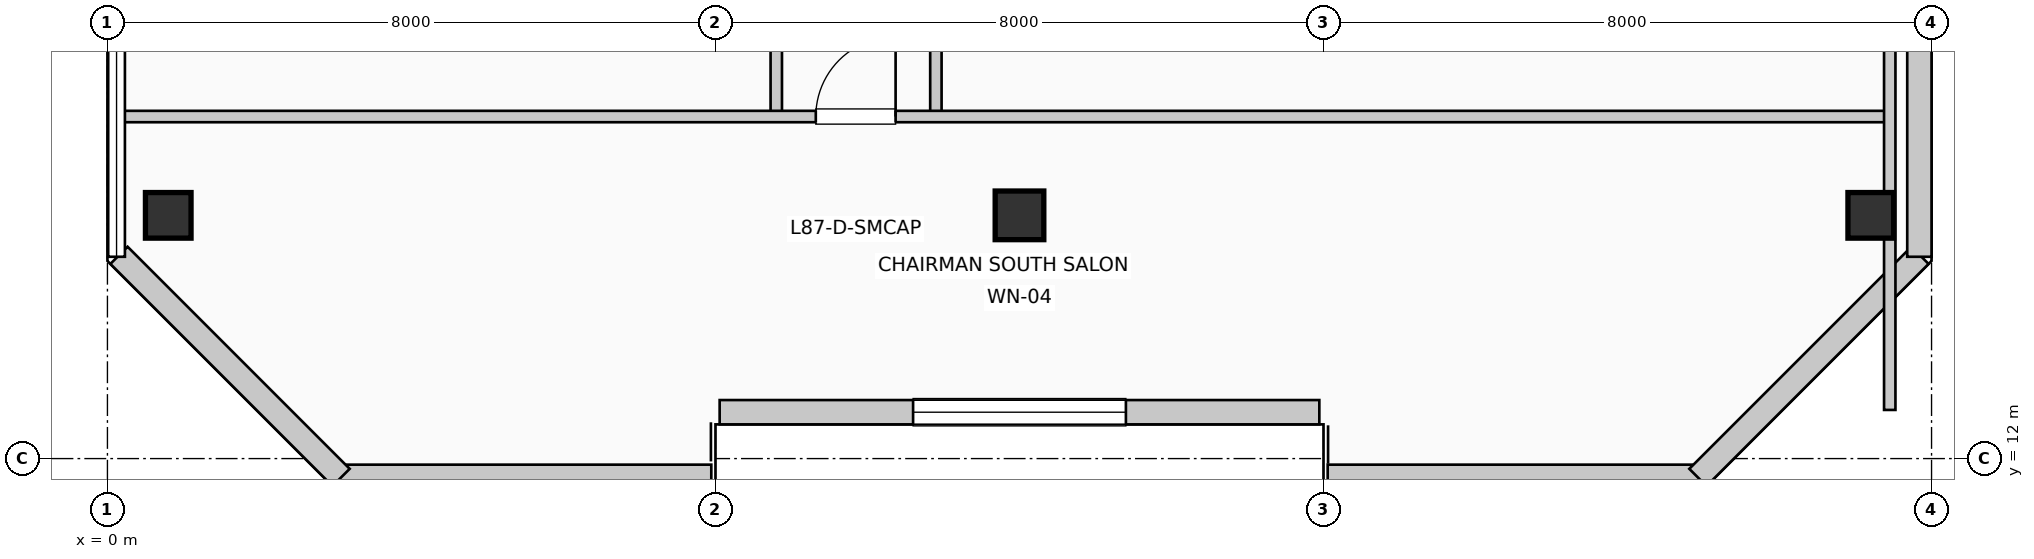
"""IFC4 building model, lengths in metres.
Left out: names, types, materials, properties, quantities, classifications, styles, units other than length and angle.
Written with IfcOpenShell. Run it as: python <this file> out.ifc"""

import sys

from ifc_helpers import new_model, si_unit, direction, frame, frame_2d, origin, origin_2d, place, context, subcontext, project, spatial, rectangle, extrude, element, fill, save


model = new_model("IFC4")
c1 = context("Model", 3, precision=1e-05, world=origin(), true_north=direction((0.0, 1.0)))
c2 = subcontext(c1, "Body", "Model", "MODEL_VIEW")
j1 = project(units=[si_unit("LENGTHUNIT", "METRE"), si_unit("PLANEANGLEUNIT", "RADIAN")], contexts=[c1])
p1 = place(None, origin())
s1 = spatial("IfcSite", under=j1, at=p1, CompositionType="ELEMENT")
p2 = place(p1, origin())
s2 = spatial("IfcBuilding", under=s1, at=p2, CompositionType="ELEMENT")
p3 = place(p2, frame((0.0, 0.0, 356.73)))
s3 = spatial("IfcBuildingStorey", under=s2, at=p3, CompositionType="ELEMENT", Elevation=356.73)
p4 = place(p3, frame((0.8, 15.2, 0.0), z_axis=(0.0, 0.0, 1.0), x_axis=(1.0, 0.0, 0.0)))
e1 = element("IfcColumn", 1, at=p4, inside=s3, PredefinedType="COLUMN", context=c2, shape_type="SweptSolid", body=[
    extrude(rectangle(XDim=0.6, YDim=0.6, at=origin_2d()), origin(), (0.0, 0.0, 1.0), 4.62),
])
p5 = place(p3, frame((12.0, 15.2, 0.0), z_axis=(0.0, 0.0, 1.0), x_axis=(1.0, 0.0, 0.0)))
e2 = element("IfcColumn", 2, at=p5, inside=s3, PredefinedType="COLUMN", context=c2, shape_type="SweptSolid", body=[
    extrude(rectangle(XDim=0.64, YDim=0.64, at=origin_2d()), origin(), (0.0, 0.0, 1.0), 4.62),
])
p6 = place(p3, frame((23.2, 15.2, 0.0), z_axis=(0.0, 0.0, 1.0), x_axis=(1.0, 0.0, 0.0)))
e3 = element("IfcColumn", 3, at=p6, inside=s3, PredefinedType="COLUMN", context=c2, shape_type="SweptSolid", body=[
    extrude(rectangle(XDim=0.6, YDim=0.6, at=origin_2d()), origin(), (0.0, 0.0, 1.0), 4.62),
])
p7 = place(p3, frame((3.055, 11.76, 0.0), z_axis=(0.0, 0.0, 1.0), x_axis=(1.0, 0.0, 0.0)))
e4 = element("IfcWall", 4, at=p7, inside=s3, PredefinedType="SOLIDWALL", context=c2, shape_type="SweptSolid", body=[
    extrude(rectangle(XDim=4.89, YDim=0.32, at=frame_2d((2.445, 0.0))), origin(), (0.0, 0.0, 1.0), 4.37),
])
p8 = place(p3, frame((8.055, 12.61, 0.0), z_axis=(0.0, 0.0, 1.0), x_axis=(1.0, 0.0, 0.0)))
e5 = element("IfcWall", 5, at=p8, inside=s3, PredefinedType="SOLIDWALL", context=c2, shape_type="SweptSolid", body=[
    extrude(rectangle(XDim=7.89, YDim=0.32, at=frame_2d((3.945, 0.0))), origin(), (0.0, 0.0, 1.0), 4.37),
])
p9 = place(p8, frame((2.545, 0.0, 0.7)))
e6 = element("IfcOpeningElement", 6, at=p9, cuts=e5, PredefinedType="OPENING", context=c2, shape_type="SweptSolid", body=[
    extrude(rectangle(XDim=2.8, YDim=2.6, at=frame_2d((1.4, 1.3))), frame((0.0, 0.17, 0.0), z_axis=(0.0, -1.0, 0.0), x_axis=(1.0, 0.0, 0.0)), (0.0, 0.0, 1.0), 0.34),
])
p10 = place(p3, frame((16.055, 11.76, 0.0), z_axis=(0.0, 0.0, 1.0), x_axis=(1.0, 0.0, 0.0)))
e7 = element("IfcWall", 7, at=p10, inside=s3, PredefinedType="SOLIDWALL", context=c2, shape_type="SweptSolid", body=[
    extrude(rectangle(XDim=4.89, YDim=0.32, at=frame_2d((2.445, 0.0))), origin(), (0.0, 0.0, 1.0), 4.37),
])
p11 = place(p3, frame((20.926, 11.752, 0.0), z_axis=(0.0, 0.0, 1.0), x_axis=(0.707077242712, 0.707136318428, 0.0)))
e8 = element("IfcWall", 8, at=p11, inside=s3, PredefinedType="SOLIDWALL", context=c2, shape_type="SweptSolid", body=[
    extrude(rectangle(XDim=4.133, YDim=0.32, at=frame_2d((2.066, 0.0))), origin(), (0.0, 0.0, 1.0), 4.37),
])
p12 = place(p3, frame((23.84, 14.655, 0.0), z_axis=(0.0, 0.0, 1.0), x_axis=(0.0, 1.0, 0.0)))
e9 = element("IfcWall", 9, at=p12, inside=s3, PredefinedType="SOLIDWALL", context=c2, shape_type="SweptSolid", body=[
    extrude(rectangle(XDim=8.29, YDim=0.32, at=frame_2d((4.145, 0.0))), origin(), (0.0, 0.0, 1.0), 4.37),
])
p13 = place(p3, frame((0.152, 14.674, 0.0), z_axis=(0.0, 0.0, 1.0), x_axis=(0.707077242712, -0.707136318428, 0.0)))
e10 = element("IfcWall", 10, at=p13, inside=s3, PredefinedType="SOLIDWALL", context=c2, shape_type="SweptSolid", body=[
    extrude(rectangle(XDim=4.133, YDim=0.32, at=frame_2d((2.066, 0.0))), origin(), (0.0, 0.0, 1.0), 4.37),
])
p14 = place(p3, frame((8.8, 16.5, 0.0), z_axis=(0.0, 0.0, 1.0), x_axis=(0.0, 1.0, 0.0)))
e11 = element("IfcWall", 11, at=p14, inside=s3, PredefinedType="PARTITIONING", context=c2, shape_type="SweptSolid", body=[
    extrude(rectangle(XDim=12.9, YDim=0.15, at=frame_2d((6.45, 0.0))), origin(), (0.0, 0.0, 1.0), 4.37),
])
p15 = place(p14, frame((3.55, 0.0, 0.0), z_axis=(0.0, 0.0, 1.0), x_axis=(-1.0, 0.0, 0.0)))
e12 = element("IfcOpeningElement", 12, at=p15, cuts=e11, PredefinedType="OPENING", context=c2, shape_type="SweptSolid", body=[
    extrude(rectangle(XDim=1.05, YDim=2.15, at=frame_2d((0.525, 1.075))), frame((0.0, 0.085, 0.0), z_axis=(0.0, -1.0, 0.0), x_axis=(1.0, 0.0, 0.0)), (0.0, 0.0, 1.0), 0.17),
])
p16 = place(p14, frame((10.05, 0.0, 0.0), z_axis=(0.0, 0.0, 1.0), x_axis=(-1.0, 0.0, 0.0)))
e13 = element("IfcOpeningElement", 13, at=p16, cuts=e11, PredefinedType="OPENING", context=c2, shape_type="SweptSolid", body=[
    extrude(rectangle(XDim=1.05, YDim=2.15, at=frame_2d((0.525, 1.075))), frame((0.0, 0.085, 0.0), z_axis=(0.0, -1.0, 0.0), x_axis=(1.0, 0.0, 0.0)), (0.0, 0.0, 1.0), 0.17),
])
p17 = place(p3, frame((10.9, 16.5, 0.0), z_axis=(0.0, 0.0, 1.0), x_axis=(0.0, 1.0, 0.0)))
e14 = element("IfcWall", 14, at=p17, inside=s3, PredefinedType="PARTITIONING", context=c2, shape_type="SweptSolid", body=[
    extrude(rectangle(XDim=12.9, YDim=0.15, at=frame_2d((6.45, 0.0))), origin(), (0.0, 0.0, 1.0), 4.37),
])
p18 = place(p17, frame((3.5, 0.0, 0.0)))
e15 = element("IfcOpeningElement", 15, at=p18, cuts=e14, PredefinedType="OPENING", context=c2, shape_type="SweptSolid", body=[
    extrude(rectangle(XDim=1.05, YDim=2.15, at=frame_2d((0.525, 1.075))), frame((0.0, 0.085, 0.0), z_axis=(0.0, -1.0, 0.0), x_axis=(1.0, 0.0, 0.0)), (0.0, 0.0, 1.0), 0.17),
])
p19 = place(p17, frame((9.0, 0.0, 0.0)))
e16 = element("IfcOpeningElement", 16, at=p19, cuts=e14, PredefinedType="OPENING", context=c2, shape_type="SweptSolid", body=[
    extrude(rectangle(XDim=1.05, YDim=2.15, at=frame_2d((0.525, 1.075))), frame((0.0, 0.085, 0.0), z_axis=(0.0, -1.0, 0.0), x_axis=(1.0, 0.0, 0.0)), (0.0, 0.0, 1.0), 0.17),
])
p20 = place(p3, frame((0.19, 16.5, 0.0), z_axis=(0.0, 0.0, 1.0), x_axis=(1.0, 0.0, 0.0)))
e17 = element("IfcWall", 17, at=p20, inside=s3, PredefinedType="PARTITIONING", context=c2, shape_type="SweptSolid", body=[
    extrude(rectangle(XDim=23.26, YDim=0.15, at=frame_2d((11.63, 0.0))), origin(), (0.0, 0.0, 1.0), 4.37),
])
p21 = place(p20, frame((9.13, 0.0, 0.0)))
e18 = element("IfcOpeningElement", 18, at=p21, cuts=e17, PredefinedType="OPENING", context=c2, shape_type="SweptSolid", body=[
    extrude(rectangle(XDim=1.05, YDim=2.15, at=frame_2d((0.525, 1.075))), frame((0.0, 0.085, 0.0), z_axis=(0.0, -1.0, 0.0), x_axis=(1.0, 0.0, 0.0)), (0.0, 0.0, 1.0), 0.17),
])
p22 = place(p3, frame((23.45, 12.64, 0.0), z_axis=(0.0, 0.0, 1.0), x_axis=(0.0, 1.0, 0.0)))
e19 = element("IfcWall", 19, at=p22, inside=s3, PredefinedType="PARTITIONING", context=c2, shape_type="SweptSolid", body=[
    extrude(rectangle(XDim=16.76, YDim=0.15, at=frame_2d((8.38, 0.0))), origin(), (0.0, 0.0, 1.0), 3.855),
])
p23 = place(p9, origin())
e20 = element("IfcWindow", 20, at=p23, inside=s3, PartitioningType="SINGLE_PANEL", PredefinedType="WINDOW", context=c2, shape_type="SweptSolid", body=[
    extrude(rectangle(XDim=2.8, YDim=2.6, at=frame_2d((1.4, 1.3))), frame((0.0, 0.03, 0.0), z_axis=(0.0, -1.0, 0.0), x_axis=(1.0, 0.0, 0.0)), (0.0, 0.0, 1.0), 0.06),
])
fill(e6, e20)
p24 = place(p21, origin())
e21 = element("IfcDoor", 21, at=p24, inside=s3, OperationType="SINGLE_SWING_RIGHT", PredefinedType="DOOR", context=c2, shape_type="SweptSolid", body=[
    extrude(rectangle(XDim=1.05, YDim=2.15, at=frame_2d((0.525, 1.075))), frame((0.0, 0.025, 0.0), z_axis=(0.0, -1.0, 0.0), x_axis=(1.0, 0.0, 0.0)), (0.0, 0.0, 1.0), 0.05),
])
fill(e18, e21)
save(model, sys.argv[1])
